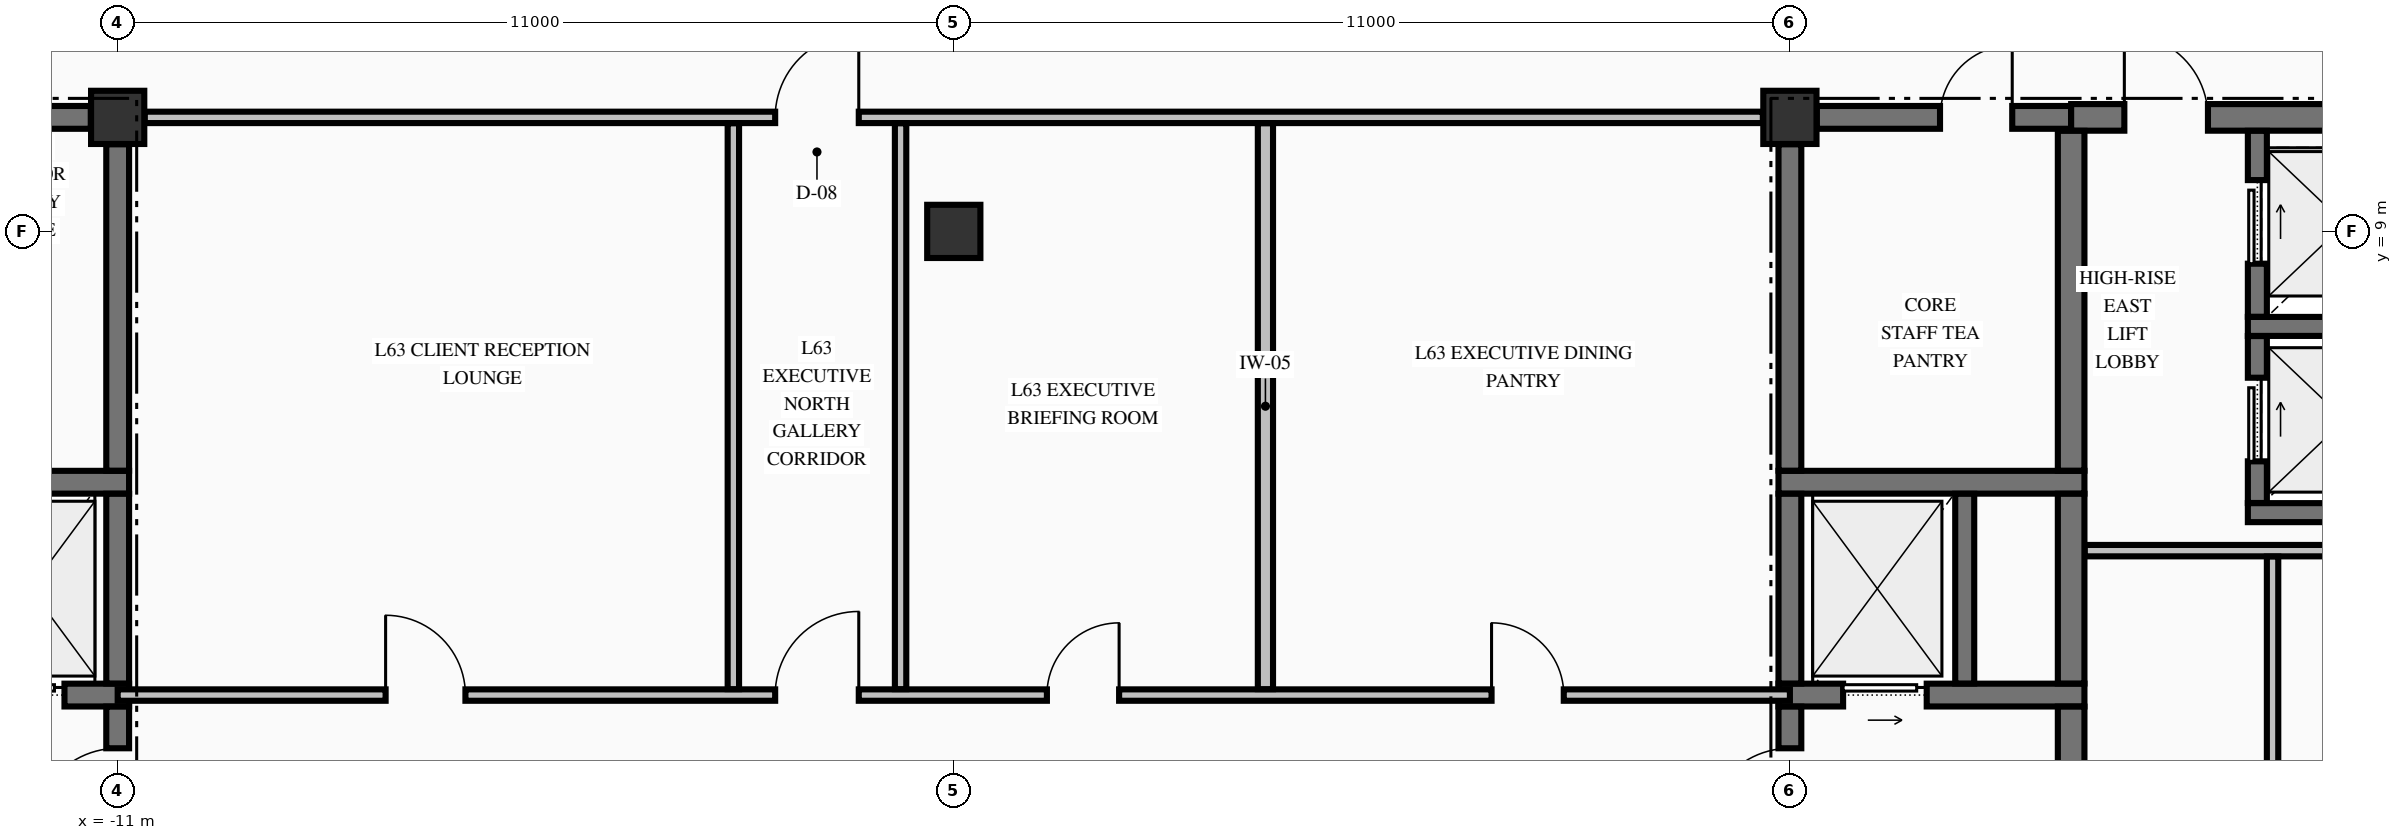
"""IFC4 building model, lengths in metres.
Left out: names, types, materials, properties, quantities, classifications, styles, units other than length and angle.
Written with IfcOpenShell. Run it as: python <this file> out.ifc"""

import sys

from ifc_helpers import new_model, si_unit, direction, frame, frame_2d, origin, origin_2d, place, context, subcontext, project, spatial, rectangle, extrude, element, fill, save


model = new_model("IFC4")
c1 = context("Model", 3, precision=1e-05, world=origin(), true_north=direction((0.0, 1.0)))
c2 = subcontext(c1, "Body", "Model", "MODEL_VIEW")
j1 = project(units=[si_unit("LENGTHUNIT", "METRE"), si_unit("PLANEANGLEUNIT", "RADIAN")], contexts=[c1])
p1 = place(None, origin())
s1 = spatial("IfcSite", under=j1, at=p1, CompositionType="ELEMENT")
p2 = place(p1, origin())
s2 = spatial("IfcBuilding", under=s1, at=p2, CompositionType="ELEMENT")
p3 = place(p2, frame((0.0, 0.0, 239.74)))
s3 = spatial("IfcBuildingStorey", under=s2, at=p3, CompositionType="ELEMENT", Elevation=239.74)
for number, where, z_axis, x_axis in (
    (1, (-11.0, 10.5, -0.25), (0.0, 0.0, 1.0), (1.0, 0.0, 0.0)),
    (2, (11.0, 10.5, -0.25), (0.0, 0.0, 1.0), (1.0, 0.0, 0.0)),
    (3, (0.0, 9.0, -0.25), (0.0, 0.0, 1.0), (1.0, 0.0, 0.0)),
):
    element("IfcColumn", number, at=place(p3, frame(where, z_axis=z_axis, x_axis=x_axis)), inside=s3, PredefinedType="COLUMN", context=c2, shape_type="SweptSolid", body=[
        extrude(rectangle(XDim=0.7, YDim=0.7, at=origin_2d()), origin(), (0.0, 0.0, 1.0), 3.23),
    ])
p4 = place(p3, frame((-14.875, 2.9, 0.0), z_axis=(0.0, 0.0, 1.0), x_axis=(1.0, 0.0, 0.0)))
e4 = element("IfcWall", 4, at=p4, inside=s3, PredefinedType="SHEAR", context=c2, shape_type="SweptSolid", body=[
    extrude(rectangle(XDim=4.025, YDim=0.3, at=frame_2d((2.012, 0.0))), origin(), (0.0, 0.0, 1.0), 2.98),
])
p5 = place(p4, frame((2.075, 0.0, 0.0)))
e5 = element("IfcOpeningElement", 5, at=p5, cuts=e4, PredefinedType="OPENING", context=c2, shape_type="SweptSolid", body=[
    extrude(rectangle(XDim=1.1, YDim=2.2, at=frame_2d((0.55, 1.1))), frame((0.0, 0.16, 0.0), z_axis=(0.0, -1.0, 0.0), x_axis=(1.0, 0.0, 0.0)), (0.0, 0.0, 1.0), 0.32),
])
p6 = place(p3, frame((10.85, 2.9, 0.0), z_axis=(0.0, 0.0, 1.0), x_axis=(1.0, 0.0, 0.0)))
e6 = element("IfcWall", 6, at=p6, inside=s3, PredefinedType="SHEAR", context=c2, shape_type="SweptSolid", body=[
    extrude(rectangle(XDim=4.025, YDim=0.3, at=frame_2d((2.012, 0.0))), origin(), (0.0, 0.0, 1.0), 2.98),
])
p7 = place(p6, frame((0.85, 0.0, 0.0)))
e7 = element("IfcOpeningElement", 7, at=p7, cuts=e6, PredefinedType="OPENING", context=c2, shape_type="SweptSolid", body=[
    extrude(rectangle(XDim=1.1, YDim=2.2, at=frame_2d((0.55, 1.1))), frame((0.0, 0.16, 0.0), z_axis=(0.0, -1.0, 0.0), x_axis=(1.0, 0.0, 0.0)), (0.0, 0.0, 1.0), 0.32),
])
p8 = place(p3, frame((17.025, 5.3, 0.0), z_axis=(0.0, 0.0, 1.0), x_axis=(1.0, 0.0, 0.0)))
e8 = element("IfcWall", 8, at=p8, inside=s3, PredefinedType="SOLIDWALL", context=c2, shape_type="SweptSolid", body=[
    extrude(rectangle(XDim=3.15, YDim=0.25, at=frame_2d((1.575, 0.0))), origin(), (0.0, 0.0, 1.0), 2.98),
])
for number, where, z_axis, x_axis in (
    (9, (-14.875, 5.7, 0.0), (0.0, 0.0, 1.0), (1.0, 0.0, 0.0)),
    (10, (10.85, 5.7, 0.0), (0.0, 0.0, 1.0), (1.0, 0.0, 0.0)),
):
    element("IfcWall", number, at=place(p3, frame(where, z_axis=z_axis, x_axis=x_axis)), inside=s3, PredefinedType="SHEAR", context=c2, shape_type="SweptSolid", body=[
        extrude(rectangle(XDim=4.025, YDim=0.3, at=frame_2d((2.012, 0.0))), origin(), (0.0, 0.0, 1.0), 2.98),
    ])
p9 = place(p3, frame((17.025, 7.75, 0.0), z_axis=(0.0, 0.0, 1.0), x_axis=(1.0, 0.0, 0.0)))
e11 = element("IfcWall", 11, at=p9, inside=s3, PredefinedType="SOLIDWALL", context=c2, shape_type="SweptSolid", body=[
    extrude(rectangle(XDim=3.15, YDim=0.25, at=frame_2d((1.575, 0.0))), origin(), (0.0, 0.0, 1.0), 2.98),
])
p10 = place(p3, frame((-14.7, 10.5, 0.0), z_axis=(0.0, 0.0, 1.0), x_axis=(1.0, 0.0, 0.0)))
e12 = element("IfcWall", 12, at=p10, inside=s3, PredefinedType="SHEAR", context=c2, shape_type="SweptSolid", body=[
    extrude(rectangle(XDim=3.346, YDim=0.3, at=frame_2d((1.673, 0.0))), origin(), (0.0, 0.0, 1.0), 2.98),
])
p11 = place(p10, frame((0.245, 0.0, 0.0)))
e13 = element("IfcOpeningElement", 13, at=p11, cuts=e12, PredefinedType="OPENING", context=c2, shape_type="SweptSolid", body=[
    extrude(rectangle(XDim=0.95, YDim=2.15, at=frame_2d((0.475, 1.075))), frame((0.0, 0.16, 0.0), z_axis=(0.0, -1.0, 0.0), x_axis=(1.0, 0.0, 0.0)), (0.0, 0.0, 1.0), 0.32),
])
p12 = place(p3, frame((11.354, 10.5, 0.0), z_axis=(0.0, 0.0, 1.0), x_axis=(1.0, 0.0, 0.0)))
e14 = element("IfcWall", 14, at=p12, inside=s3, PredefinedType="SHEAR", context=c2, shape_type="SweptSolid", body=[
    extrude(rectangle(XDim=3.346, YDim=0.3, at=frame_2d((1.673, 0.0))), origin(), (0.0, 0.0, 1.0), 2.98),
])
p13 = place(p12, frame((1.621, 0.0, 0.0)))
e15 = element("IfcOpeningElement", 15, at=p13, cuts=e14, PredefinedType="OPENING", context=c2, shape_type="SweptSolid", body=[
    extrude(rectangle(XDim=0.95, YDim=2.15, at=frame_2d((0.475, 1.075))), frame((0.0, 0.16, 0.0), z_axis=(0.0, -1.0, 0.0), x_axis=(1.0, 0.0, 0.0)), (0.0, 0.0, 1.0), 0.32),
])
p14 = place(p3, frame((14.7, 10.5, 0.0), z_axis=(0.0, 0.0, 1.0), x_axis=(1.0, 0.0, 0.0)))
e16 = element("IfcWall", 16, at=p14, inside=s3, PredefinedType="SHEAR", context=c2, shape_type="SweptSolid", body=[
    extrude(rectangle(XDim=4.946, YDim=0.35, at=frame_2d((2.473, 0.0))), origin(), (0.0, 0.0, 1.0), 2.98),
])
p15 = place(p14, frame((0.7, 0.0, 0.0)))
e17 = element("IfcOpeningElement", 17, at=p15, cuts=e16, PredefinedType="OPENING", context=c2, shape_type="SweptSolid", body=[
    extrude(rectangle(XDim=1.1, YDim=2.15, at=frame_2d((0.55, 1.075))), frame((0.0, 0.185, 0.0), z_axis=(0.0, -1.0, 0.0), x_axis=(1.0, 0.0, 0.0)), (0.0, 0.0, 1.0), 0.37),
])
p16 = place(p3, frame((-11.0, 2.9, 0.0), z_axis=(0.0, 0.0, 1.0), x_axis=(1.0, 0.0, 0.0)))
e18 = element("IfcWall", 18, at=p16, inside=s3, PredefinedType="PARTITIONING", context=c2, shape_type="SweptSolid", body=[
    extrude(rectangle(XDim=22.0, YDim=0.15, at=frame_2d((11.0, 0.0))), origin(), (0.0, 0.0, 1.0), 2.98),
])
p17 = place(p16, frame((8.65, 0.0, 0.0)))
e19 = element("IfcOpeningElement", 19, at=p17, cuts=e18, PredefinedType="OPENING", context=c2, shape_type="SweptSolid", body=[
    extrude(rectangle(XDim=1.1, YDim=2.15, at=frame_2d((0.55, 1.075))), frame((0.0, 0.085, 0.0), z_axis=(0.0, -1.0, 0.0), x_axis=(1.0, 0.0, 0.0)), (0.0, 0.0, 1.0), 0.17),
])
p18 = place(p16, frame((3.525, 0.0, 0.0)))
e20 = element("IfcOpeningElement", 20, at=p18, cuts=e18, PredefinedType="OPENING", context=c2, shape_type="SweptSolid", body=[
    extrude(rectangle(XDim=1.05, YDim=2.15, at=frame_2d((0.525, 1.075))), frame((0.0, 0.085, 0.0), z_axis=(0.0, -1.0, 0.0), x_axis=(1.0, 0.0, 0.0)), (0.0, 0.0, 1.0), 0.17),
])
p19 = place(p16, frame((12.225, 0.0, 0.0)))
e21 = element("IfcOpeningElement", 21, at=p19, cuts=e18, PredefinedType="OPENING", context=c2, shape_type="SweptSolid", body=[
    extrude(rectangle(XDim=0.95, YDim=2.15, at=frame_2d((0.475, 1.075))), frame((0.0, 0.085, 0.0), z_axis=(0.0, -1.0, 0.0), x_axis=(1.0, 0.0, 0.0)), (0.0, 0.0, 1.0), 0.17),
])
p20 = place(p16, frame((18.075, 0.0, 0.0)))
e22 = element("IfcOpeningElement", 22, at=p20, cuts=e18, PredefinedType="OPENING", context=c2, shape_type="SweptSolid", body=[
    extrude(rectangle(XDim=0.95, YDim=2.15, at=frame_2d((0.475, 1.075))), frame((0.0, 0.085, 0.0), z_axis=(0.0, -1.0, 0.0), x_axis=(1.0, 0.0, 0.0)), (0.0, 0.0, 1.0), 0.17),
])
p21 = place(p3, frame((14.878, 4.8, 0.0), z_axis=(0.0, 0.0, 1.0), x_axis=(1.0, 0.0, 0.0)))
e23 = element("IfcWall", 23, at=p21, inside=s3, PredefinedType="PARTITIONING", context=c2, shape_type="SweptSolid", body=[
    extrude(rectangle(XDim=4.944, YDim=0.15, at=frame_2d((2.472, 0.0))), origin(), (0.0, 0.0, 1.0), 2.98),
])
p22 = place(p3, frame((-10.644, 10.5, 0.0), z_axis=(0.0, 0.0, 1.0), x_axis=(1.0, 0.0, 0.0)))
e24 = element("IfcWall", 24, at=p22, inside=s3, PredefinedType="PARTITIONING", context=c2, shape_type="SweptSolid", body=[
    extrude(rectangle(XDim=21.288, YDim=0.15, at=frame_2d((10.644, 0.0))), origin(), (0.0, 0.0, 1.0), 2.98),
])
p23 = place(p22, frame((8.294, 0.0, 0.0)))
e25 = element("IfcOpeningElement", 25, at=p23, cuts=e24, PredefinedType="OPENING", context=c2, shape_type="SweptSolid", body=[
    extrude(rectangle(XDim=1.1, YDim=2.15, at=frame_2d((0.55, 1.075))), frame((0.0, 0.085, 0.0), z_axis=(0.0, -1.0, 0.0), x_axis=(1.0, 0.0, 0.0)), (0.0, 0.0, 1.0), 0.17),
])
p24 = place(p3, frame((-11.0, 0.354, 0.0), z_axis=(0.0, 0.0, 1.0), x_axis=(0.0, 1.0, 0.0)))
e26 = element("IfcWall", 26, at=p24, inside=s3, PredefinedType="SHEAR", context=c2, shape_type="SweptSolid", body=[
    extrude(rectangle(XDim=2.394, YDim=0.3, at=frame_2d((1.197, 0.0))), origin(), (0.0, 0.0, 1.0), 2.98),
])
p25 = place(p24, frame((0.746, 0.0, 0.0)))
e27 = element("IfcOpeningElement", 27, at=p25, cuts=e26, PredefinedType="OPENING", context=c2, shape_type="SweptSolid", body=[
    extrude(rectangle(XDim=1.1, YDim=2.15, at=frame_2d((0.55, 1.075))), frame((0.0, 0.16, 0.0), z_axis=(0.0, -1.0, 0.0), x_axis=(1.0, 0.0, 0.0)), (0.0, 0.0, 1.0), 0.32),
])
p26 = place(p3, frame((-11.0, 3.052, 0.0), z_axis=(0.0, 0.0, 1.0), x_axis=(0.0, 1.0, 0.0)))
e28 = element("IfcWall", 28, at=p26, inside=s3, PredefinedType="SHEAR", context=c2, shape_type="SweptSolid", body=[
    extrude(rectangle(XDim=2.496, YDim=0.3, at=frame_2d((1.248, 0.0))), origin(), (0.0, 0.0, 1.0), 2.98),
])
p27 = place(p3, frame((-11.0, 5.852, 0.0), z_axis=(0.0, 0.0, 1.0), x_axis=(0.0, 1.0, 0.0)))
e29 = element("IfcWall", 29, at=p27, inside=s3, PredefinedType="SHEAR", context=c2, shape_type="SweptSolid", body=[
    extrude(rectangle(XDim=4.294, YDim=0.3, at=frame_2d((2.147, 0.0))), origin(), (0.0, 0.0, 1.0), 2.98),
])
p28 = place(p3, frame((11.0, 0.354, 0.0), z_axis=(0.0, 0.0, 1.0), x_axis=(0.0, 1.0, 0.0)))
e30 = element("IfcWall", 30, at=p28, inside=s3, PredefinedType="SHEAR", context=c2, shape_type="SweptSolid", body=[
    extrude(rectangle(XDim=2.394, YDim=0.3, at=frame_2d((1.197, 0.0))), origin(), (0.0, 0.0, 1.0), 2.98),
])
p29 = place(p28, frame((0.746, 0.0, 0.0)))
e31 = element("IfcOpeningElement", 31, at=p29, cuts=e30, PredefinedType="OPENING", context=c2, shape_type="SweptSolid", body=[
    extrude(rectangle(XDim=1.1, YDim=2.15, at=frame_2d((0.55, 1.075))), frame((0.0, 0.16, 0.0), z_axis=(0.0, -1.0, 0.0), x_axis=(1.0, 0.0, 0.0)), (0.0, 0.0, 1.0), 0.32),
])
p30 = place(p3, frame((11.0, 3.052, 0.0), z_axis=(0.0, 0.0, 1.0), x_axis=(0.0, 1.0, 0.0)))
e32 = element("IfcWall", 32, at=p30, inside=s3, PredefinedType="SHEAR", context=c2, shape_type="SweptSolid", body=[
    extrude(rectangle(XDim=2.496, YDim=0.3, at=frame_2d((1.248, 0.0))), origin(), (0.0, 0.0, 1.0), 2.98),
])
p31 = place(p3, frame((11.0, 5.852, 0.0), z_axis=(0.0, 0.0, 1.0), x_axis=(0.0, 1.0, 0.0)))
e33 = element("IfcWall", 33, at=p31, inside=s3, PredefinedType="SHEAR", context=c2, shape_type="SweptSolid", body=[
    extrude(rectangle(XDim=4.294, YDim=0.3, at=frame_2d((2.147, 0.0))), origin(), (0.0, 0.0, 1.0), 2.98),
])
p32 = place(p3, frame((13.3, 3.052, 0.0), z_axis=(0.0, 0.0, 1.0), x_axis=(0.0, 1.0, 0.0)))
e34 = element("IfcWall", 34, at=p32, inside=s3, PredefinedType="SOLIDWALL", context=c2, shape_type="SweptSolid", body=[
    extrude(rectangle(XDim=2.496, YDim=0.25, at=frame_2d((1.248, 0.0))), origin(), (0.0, 0.0, 1.0), 2.98),
])
p33 = place(p3, frame((14.7, -0.098, 0.0), z_axis=(0.0, 0.0, 1.0), x_axis=(0.0, 1.0, 0.0)))
e35 = element("IfcWall", 35, at=p33, inside=s3, PredefinedType="SHEAR", context=c2, shape_type="SweptSolid", body=[
    extrude(rectangle(XDim=2.846, YDim=0.35, at=frame_2d((1.423, 0.0))), origin(), (0.0, 0.0, 1.0), 2.98),
])
p34 = place(p3, frame((14.7, 3.052, 0.0), z_axis=(0.0, 0.0, 1.0), x_axis=(0.0, 1.0, 0.0)))
e36 = element("IfcWall", 36, at=p34, inside=s3, PredefinedType="SHEAR", context=c2, shape_type="SweptSolid", body=[
    extrude(rectangle(XDim=2.496, YDim=0.35, at=frame_2d((1.248, 0.0))), origin(), (0.0, 0.0, 1.0), 2.98),
])
p35 = place(p3, frame((14.7, 5.852, 0.0), z_axis=(0.0, 0.0, 1.0), x_axis=(0.0, 1.0, 0.0)))
e37 = element("IfcWall", 37, at=p35, inside=s3, PredefinedType="SHEAR", context=c2, shape_type="SweptSolid", body=[
    extrude(rectangle(XDim=4.471, YDim=0.35, at=frame_2d((2.235, 0.0))), origin(), (0.0, 0.0, 1.0), 2.98),
])
p36 = place(p3, frame((17.15, 5.427, 0.0), z_axis=(0.0, 0.0, 1.0), x_axis=(0.0, 1.0, 0.0)))
e38 = element("IfcWall", 38, at=p36, inside=s3, PredefinedType="SOLIDWALL", context=c2, shape_type="SweptSolid", body=[
    extrude(rectangle(XDim=2.196, YDim=0.25, at=frame_2d((1.098, 0.0))), origin(), (0.0, 0.0, 1.0), 2.98),
])
p37 = place(p36, frame((0.548, 0.0, 0.0)))
e39 = element("IfcOpeningElement", 39, at=p37, cuts=e38, PredefinedType="OPENING", context=c2, shape_type="SweptSolid", body=[
    extrude(rectangle(XDim=1.1, YDim=2.2, at=frame_2d((0.55, 1.1))), frame((0.0, 0.135, 0.0), z_axis=(0.0, -1.0, 0.0), x_axis=(1.0, 0.0, 0.0)), (0.0, 0.0, 1.0), 0.27),
])
p38 = place(p3, frame((17.15, 7.877, 0.0), z_axis=(0.0, 0.0, 1.0), x_axis=(0.0, 1.0, 0.0)))
e40 = element("IfcWall", 40, at=p38, inside=s3, PredefinedType="SOLIDWALL", context=c2, shape_type="SweptSolid", body=[
    extrude(rectangle(XDim=2.446, YDim=0.25, at=frame_2d((1.223, 0.0))), origin(), (0.0, 0.0, 1.0), 2.98),
])
p39 = place(p38, frame((0.698, 0.0, 0.0)))
e41 = element("IfcOpeningElement", 41, at=p39, cuts=e40, PredefinedType="OPENING", context=c2, shape_type="SweptSolid", body=[
    extrude(rectangle(XDim=1.1, YDim=2.2, at=frame_2d((0.55, 1.1))), frame((0.0, 0.135, 0.0), z_axis=(0.0, -1.0, 0.0), x_axis=(1.0, 0.0, 0.0)), (0.0, 0.0, 1.0), 0.27),
])
for number, where, z_axis, x_axis in (
    (42, (-2.9, 2.978, 0.0), (0.0, 0.0, 1.0), (0.0, 1.0, 0.0)),
    (43, (-0.7, 2.978, 0.0), (0.0, 0.0, 1.0), (0.0, 1.0, 0.0)),
):
    element("IfcWall", number, at=place(p3, frame(where, z_axis=z_axis, x_axis=x_axis)), inside=s3, PredefinedType="PARTITIONING", context=c2, shape_type="SweptSolid", body=[
        extrude(rectangle(XDim=7.444, YDim=0.15, at=frame_2d((3.722, 0.0))), origin(), (0.0, 0.0, 1.0), 2.98),
    ])
p40 = place(p3, frame((4.1, 2.978, 0.0), z_axis=(0.0, 0.0, 1.0), x_axis=(0.0, 1.0, 0.0)))
e44 = element("IfcWall", 44, at=p40, inside=s3, PredefinedType="PARTITIONING", context=c2, shape_type="SweptSolid", body=[
    extrude(rectangle(XDim=7.444, YDim=0.2, at=frame_2d((3.722, 0.0))), origin(), (0.0, 0.0, 1.0), 2.98),
])
p41 = place(p3, frame((17.35, -9.772, 0.0), z_axis=(0.0, 0.0, 1.0), x_axis=(0.0, 1.0, 0.0)))
e45 = element("IfcWall", 45, at=p41, inside=s3, PredefinedType="PARTITIONING", context=c2, shape_type="SweptSolid", body=[
    extrude(rectangle(XDim=14.494, YDim=0.15, at=frame_2d((7.247, 0.0))), origin(), (0.0, 0.0, 1.0), 2.98),
])
p42 = place(p25, origin())
e46 = element("IfcDoor", 46, at=p42, inside=s3, OperationType="SINGLE_SWING_LEFT", PredefinedType="DOOR", context=c2, shape_type="SweptSolid", body=[
    extrude(rectangle(XDim=1.1, YDim=2.15, at=frame_2d((0.55, 1.075))), frame((0.0, 0.025, 0.0), z_axis=(0.0, -1.0, 0.0), x_axis=(1.0, 0.0, 0.0)), (0.0, 0.0, 1.0), 0.05),
])
fill(e27, e46)
p43 = place(p5, origin())
e47 = element("IfcDoor", 47, at=p43, inside=s3, OperationType="SLIDING_TO_LEFT", PredefinedType="DOOR", context=c2, shape_type="SweptSolid", body=[
    extrude(rectangle(XDim=1.1, YDim=2.2, at=frame_2d((0.55, 1.1))), frame((0.0, 0.025, 0.0), z_axis=(0.0, -1.0, 0.0), x_axis=(1.0, 0.0, 0.0)), (0.0, 0.0, 1.0), 0.05),
])
fill(e5, e47)
p44 = place(p29, origin())
e48 = element("IfcDoor", 48, at=p44, inside=s3, OperationType="SINGLE_SWING_LEFT", PredefinedType="DOOR", context=c2, shape_type="SweptSolid", body=[
    extrude(rectangle(XDim=1.1, YDim=2.15, at=frame_2d((0.55, 1.075))), frame((0.0, 0.025, 0.0), z_axis=(0.0, -1.0, 0.0), x_axis=(1.0, 0.0, 0.0)), (0.0, 0.0, 1.0), 0.05),
])
fill(e31, e48)
p45 = place(p7, origin())
e49 = element("IfcDoor", 49, at=p45, inside=s3, OperationType="SLIDING_TO_RIGHT", PredefinedType="DOOR", context=c2, shape_type="SweptSolid", body=[
    extrude(rectangle(XDim=1.1, YDim=2.2, at=frame_2d((0.55, 1.1))), frame((0.0, 0.025, 0.0), z_axis=(0.0, -1.0, 0.0), x_axis=(1.0, 0.0, 0.0)), (0.0, 0.0, 1.0), 0.05),
])
fill(e7, e49)
p46 = place(p13, origin())
e50 = element("IfcDoor", 50, at=p46, inside=s3, OperationType="SINGLE_SWING_RIGHT", PredefinedType="DOOR", context=c2, shape_type="SweptSolid", body=[
    extrude(rectangle(XDim=0.95, YDim=2.15, at=frame_2d((0.475, 1.075))), frame((0.0, 0.025, 0.0), z_axis=(0.0, -1.0, 0.0), x_axis=(1.0, 0.0, 0.0)), (0.0, 0.0, 1.0), 0.05),
])
fill(e15, e50)
p47 = place(p37, origin())
e51 = element("IfcDoor", 51, at=p47, inside=s3, OperationType="SLIDING_TO_RIGHT", PredefinedType="DOOR", context=c2, shape_type="SweptSolid", body=[
    extrude(rectangle(XDim=1.1, YDim=2.2, at=frame_2d((0.55, 1.1))), frame((0.0, 0.025, 0.0), z_axis=(0.0, -1.0, 0.0), x_axis=(1.0, 0.0, 0.0)), (0.0, 0.0, 1.0), 0.05),
])
fill(e39, e51)
p48 = place(p39, origin())
e52 = element("IfcDoor", 52, at=p48, inside=s3, OperationType="SLIDING_TO_RIGHT", PredefinedType="DOOR", context=c2, shape_type="SweptSolid", body=[
    extrude(rectangle(XDim=1.1, YDim=2.2, at=frame_2d((0.55, 1.1))), frame((0.0, 0.025, 0.0), z_axis=(0.0, -1.0, 0.0), x_axis=(1.0, 0.0, 0.0)), (0.0, 0.0, 1.0), 0.05),
])
fill(e41, e52)
p49 = place(p15, origin())
e53 = element("IfcDoor", 53, at=p49, inside=s3, OperationType="SINGLE_SWING_LEFT", PredefinedType="DOOR", context=c2, shape_type="SweptSolid", body=[
    extrude(rectangle(XDim=1.1, YDim=2.15, at=frame_2d((0.55, 1.075))), frame((0.0, 0.025, 0.0), z_axis=(0.0, -1.0, 0.0), x_axis=(1.0, 0.0, 0.0)), (0.0, 0.0, 1.0), 0.05),
])
fill(e17, e53)
p50 = place(p23, origin())
e54 = element("IfcDoor", 54, at=p50, inside=s3, OperationType="SINGLE_SWING_RIGHT", PredefinedType="DOOR", context=c2, shape_type="SweptSolid", body=[
    extrude(rectangle(XDim=1.1, YDim=2.15, at=frame_2d((0.55, 1.075))), frame((0.0, 0.025, 0.0), z_axis=(0.0, -1.0, 0.0), x_axis=(1.0, 0.0, 0.0)), (0.0, 0.0, 1.0), 0.05),
])
fill(e25, e54)
p51 = place(p17, origin())
e55 = element("IfcDoor", 55, at=p51, inside=s3, OperationType="SINGLE_SWING_RIGHT", PredefinedType="DOOR", context=c2, shape_type="SweptSolid", body=[
    extrude(rectangle(XDim=1.1, YDim=2.15, at=frame_2d((0.55, 1.075))), frame((0.0, 0.025, 0.0), z_axis=(0.0, -1.0, 0.0), x_axis=(1.0, 0.0, 0.0)), (0.0, 0.0, 1.0), 0.05),
])
fill(e19, e55)
p52 = place(p18, origin())
e56 = element("IfcDoor", 56, at=p52, inside=s3, OperationType="SINGLE_SWING_LEFT", PredefinedType="DOOR", context=c2, shape_type="SweptSolid", body=[
    extrude(rectangle(XDim=1.05, YDim=2.15, at=frame_2d((0.525, 1.075))), frame((0.0, 0.025, 0.0), z_axis=(0.0, -1.0, 0.0), x_axis=(1.0, 0.0, 0.0)), (0.0, 0.0, 1.0), 0.05),
])
fill(e20, e56)
p53 = place(p19, origin())
e57 = element("IfcDoor", 57, at=p53, inside=s3, OperationType="SINGLE_SWING_RIGHT", PredefinedType="DOOR", context=c2, shape_type="SweptSolid", body=[
    extrude(rectangle(XDim=0.95, YDim=2.15, at=frame_2d((0.475, 1.075))), frame((0.0, 0.025, 0.0), z_axis=(0.0, -1.0, 0.0), x_axis=(1.0, 0.0, 0.0)), (0.0, 0.0, 1.0), 0.05),
])
fill(e21, e57)
p54 = place(p20, origin())
e58 = element("IfcDoor", 58, at=p54, inside=s3, OperationType="SINGLE_SWING_LEFT", PredefinedType="DOOR", context=c2, shape_type="SweptSolid", body=[
    extrude(rectangle(XDim=0.95, YDim=2.15, at=frame_2d((0.475, 1.075))), frame((0.0, 0.025, 0.0), z_axis=(0.0, -1.0, 0.0), x_axis=(1.0, 0.0, 0.0)), (0.0, 0.0, 1.0), 0.05),
])
fill(e22, e58)
save(model, sys.argv[1])
